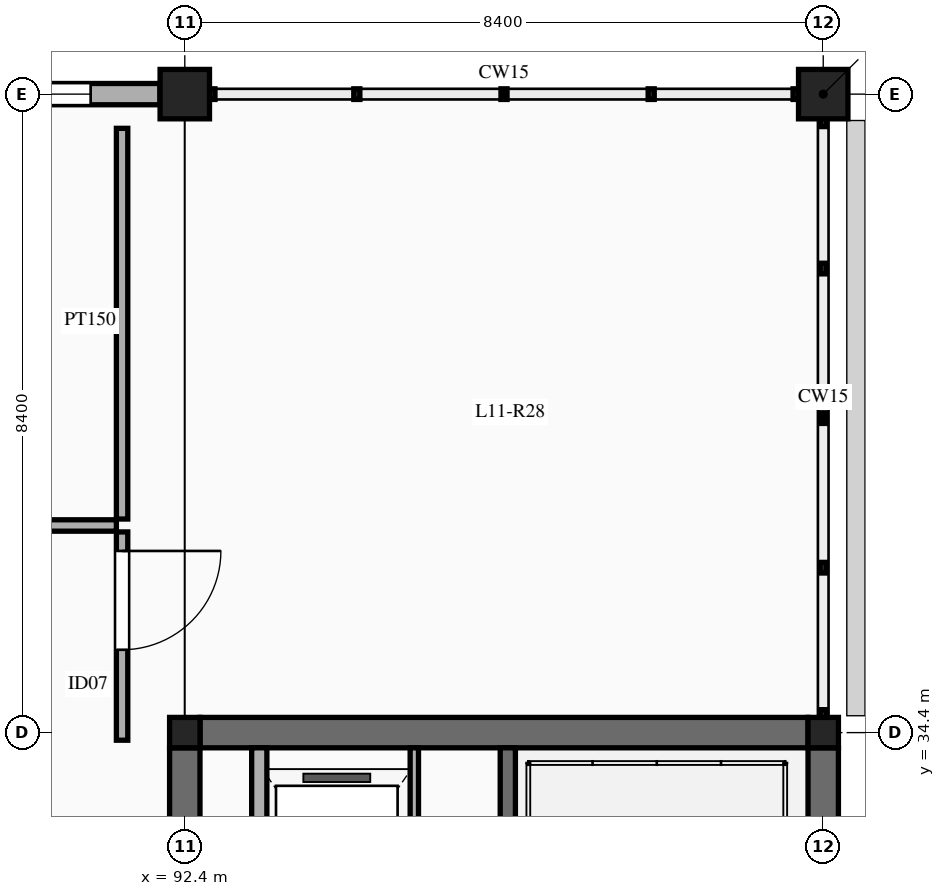
"""IFC4 building model, lengths in metres.
Left out: names, types, materials, properties, quantities, classifications, styles, units other than length and angle.
Written with IfcOpenShell. Run it as: python <this file> out.ifc"""

import sys

from ifc_helpers import new_model, si_unit, direction, frame, frame_2d, origin, origin_2d, place, context, subcontext, project, spatial, rectangle, extrude, element, fill, save


model = new_model("IFC4")
c1 = context("Model", 3, precision=1e-05, world=origin(), true_north=direction((0.0, 1.0)))
c2 = subcontext(c1, "Body", "Model", "MODEL_VIEW")
j1 = project(units=[si_unit("LENGTHUNIT", "METRE"), si_unit("PLANEANGLEUNIT", "RADIAN")], contexts=[c1])
p1 = place(None, origin())
s1 = spatial("IfcSite", under=j1, at=p1, CompositionType="ELEMENT")
p2 = place(p1, origin())
s2 = spatial("IfcBuilding", under=s1, at=p2, CompositionType="ELEMENT")
p3 = place(p2, frame((0.0, 0.0, 51.0)))
s3 = spatial("IfcBuildingStorey", under=s2, at=p3, CompositionType="ELEMENT", Elevation=51.0)
p4 = place(p3, frame((92.4, 34.4, 0.0), z_axis=(0.0, 0.0, 1.0), x_axis=(1.0, 0.0, 0.0)))
e1 = element("IfcColumn", 1, at=p4, inside=s3, PredefinedType="COLUMN", context=c2, shape_type="SweptSolid", body=[
    extrude(rectangle(XDim=0.4, YDim=0.4, at=origin_2d()), origin(), (0.0, 0.0, 1.0), 4.5),
])
p5 = place(p3, frame((92.4, 42.8, 0.0), z_axis=(0.0, 0.0, 1.0), x_axis=(1.0, 0.0, 0.0)))
e2 = element("IfcColumn", 2, at=p5, inside=s3, PredefinedType="COLUMN", context=c2, shape_type="SweptSolid", body=[
    extrude(rectangle(XDim=0.65, YDim=0.65, at=origin_2d()), origin(), (0.0, 0.0, 1.0), 4.5),
])
p6 = place(p3, frame((100.8, 34.4, 0.0), z_axis=(0.0, 0.0, 1.0), x_axis=(1.0, 0.0, 0.0)))
e3 = element("IfcColumn", 3, at=p6, inside=s3, PredefinedType="COLUMN", context=c2, shape_type="SweptSolid", body=[
    extrude(rectangle(XDim=0.4, YDim=0.4, at=origin_2d()), origin(), (0.0, 0.0, 1.0), 4.5),
])
p7 = place(p3, frame((100.8, 42.8, 0.0), z_axis=(0.0, 0.0, 1.0), x_axis=(1.0, 0.0, 0.0)))
e4 = element("IfcColumn", 4, at=p7, inside=s3, PredefinedType="COLUMN", context=c2, shape_type="SweptSolid", body=[
    extrude(rectangle(XDim=0.65, YDim=0.65, at=origin_2d()), origin(), (0.0, 0.0, 1.0), 4.5),
])
for number, where, z_axis, x_axis in (
    (5, (92.4, 26.2, 0.0), (0.0, 0.0, 1.0), (0.0, 1.0, 0.0)),
    (6, (100.8, 26.2, 0.0), (0.0, 0.0, 1.0), (0.0, 1.0, 0.0)),
    (7, (92.6, 34.4, 0.0), (0.0, 0.0, 1.0), (1.0, 0.0, 0.0)),
):
    element("IfcWall", number, at=place(p3, frame(where, z_axis=z_axis, x_axis=x_axis)), inside=s3, PredefinedType="SHEAR", context=c2, shape_type="SweptSolid", body=[
        extrude(rectangle(XDim=8.0, YDim=0.4, at=frame_2d((4.0, 0.0))), origin(), (0.0, 0.0, 1.0), 4.5),
    ])
p8 = place(p3, frame((84.327, 42.8, 0.0), z_axis=(0.0, 0.0, 1.0), x_axis=(1.0, 0.0, 0.0)))
e8 = element("IfcWall", 8, at=p8, inside=s3, PredefinedType="ELEMENTEDWALL", context=c2, shape_type="SweptSolid", body=[
    extrude(rectangle(XDim=7.746, YDim=0.28, at=frame_2d((3.873, 0.0))), origin(), (0.0, 0.0, 1.0), 3.55),
])
p9 = place(p8, frame((1.187, 0.0, 0.9)))
e9 = element("IfcOpeningElement", 9, at=p9, cuts=e8, PredefinedType="OPENING", context=c2, shape_type="SweptSolid", body=[
    extrude(rectangle(XDim=1.5, YDim=2.0, at=frame_2d((0.75, 1.0))), frame((0.0, 0.15, 0.0), z_axis=(0.0, -1.0, 0.0), x_axis=(1.0, 0.0, 0.0)), (0.0, 0.0, 1.0), 0.3),
])
p10 = place(p8, frame((4.784, 0.0, 0.9)))
e10 = element("IfcOpeningElement", 10, at=p10, cuts=e8, PredefinedType="OPENING", context=c2, shape_type="SweptSolid", body=[
    extrude(rectangle(XDim=2.05, YDim=2.1, at=frame_2d((1.025, 1.05))), frame((0.0, 0.15, 0.0), z_axis=(0.0, -1.0, 0.0), x_axis=(1.0, 0.0, 0.0)), (0.0, 0.0, 1.0), 0.3),
])
p11 = place(p3, frame((96.65, 26.1, 0.0), z_axis=(0.0, 0.0, 1.0), x_axis=(0.0, 1.0, 0.0)))
e11 = element("IfcWall", 11, at=p11, inside=s3, PredefinedType="SOLIDWALL", context=c2, shape_type="SweptSolid", body=[
    extrude(rectangle(XDim=8.1, YDim=0.2, at=frame_2d((4.05, 0.0))), origin(), (0.0, 0.0, 1.0), 4.3),
])
p12 = place(p11, frame((0.45, 0.0, 0.0)))
e12 = element("IfcOpeningElement", 12, at=p12, cuts=e11, PredefinedType="OPENING", context=c2, shape_type="SweptSolid", body=[
    extrude(rectangle(XDim=1.12, YDim=2.15, at=frame_2d((0.56, 1.075))), frame((0.0, 0.11, 0.0), z_axis=(0.0, -1.0, 0.0), x_axis=(1.0, 0.0, 0.0)), (0.0, 0.0, 1.0), 0.22),
])
p13 = place(p3, frame((95.42, 31.15, 0.0), z_axis=(0.0, 0.0, 1.0), x_axis=(0.0, 1.0, 0.0)))
e13 = element("IfcWall", 13, at=p13, inside=s3, PredefinedType="PARTITIONING", context=c2, shape_type="SweptSolid", body=[
    extrude(rectangle(XDim=3.05, YDim=0.11, at=frame_2d((1.525, 0.0))), origin(), (0.0, 0.0, 1.0), 4.3),
])
p14 = place(p3, frame((93.38, 31.15, 0.0), z_axis=(0.0, 0.0, 1.0), x_axis=(0.0, 1.0, 0.0)))
e14 = element("IfcWall", 14, at=p14, inside=s3, PredefinedType="SOLIDWALL", context=c2, shape_type="SweptSolid", body=[
    extrude(rectangle(XDim=3.05, YDim=0.2, at=frame_2d((1.525, 0.0))), origin(), (0.0, 0.0, 1.0), 4.3),
])
p15 = place(p3, frame((82.15, 37.125, 0.0), z_axis=(0.0, 0.0, 1.0), x_axis=(1.0, 0.0, 0.0)))
e15 = element("IfcWall", 15, at=p15, inside=s3, PredefinedType="PARTITIONING", context=c2, shape_type="SweptSolid", body=[
    extrude(rectangle(XDim=9.35, YDim=0.15, at=frame_2d((4.675, 0.0))), origin(), (0.0, 0.0, 1.0), 3.45),
])
p16 = place(p15, frame((4.175, 0.0, 0.0)))
e16 = element("IfcOpeningElement", 16, at=p16, cuts=e15, PredefinedType="OPENING", context=c2, shape_type="SweptSolid", body=[
    extrude(rectangle(XDim=1.0, YDim=2.15, at=frame_2d((0.5, 1.075))), frame((0.0, 0.085, 0.0), z_axis=(0.0, -1.0, 0.0), x_axis=(1.0, 0.0, 0.0)), (0.0, 0.0, 1.0), 0.17),
])
p17 = place(p3, frame((91.575, 34.3, 0.0), z_axis=(0.0, 0.0, 1.0), x_axis=(0.0, 1.0, 0.0)))
e17 = element("IfcWall", 17, at=p17, inside=s3, PredefinedType="PARTITIONING", context=c2, shape_type="SweptSolid", body=[
    extrude(rectangle(XDim=2.74, YDim=0.15, at=frame_2d((1.37, 0.0))), origin(), (0.0, 0.0, 1.0), 3.45),
])
p18 = place(p17, frame((1.19, 0.0, 0.0)))
e18 = element("IfcOpeningElement", 18, at=p18, cuts=e17, PredefinedType="OPENING", context=c2, shape_type="SweptSolid", body=[
    extrude(rectangle(XDim=1.3, YDim=2.25, at=frame_2d((0.65, 1.125))), frame((0.0, 0.085, 0.0), z_axis=(0.0, -1.0, 0.0), x_axis=(1.0, 0.0, 0.0)), (0.0, 0.0, 1.0), 0.17),
])
p19 = place(p3, frame((91.575, 37.21, 0.0), z_axis=(0.0, 0.0, 1.0), x_axis=(0.0, 1.0, 0.0)))
e19 = element("IfcWall", 19, at=p19, inside=s3, PredefinedType="PARTITIONING", context=c2, shape_type="SweptSolid", body=[
    extrude(rectangle(XDim=5.14, YDim=0.15, at=frame_2d((2.57, 0.0))), origin(), (0.0, 0.0, 1.0), 3.45),
])
p20 = place(p10, origin())
e20 = element("IfcWindow", 20, at=p20, inside=s3, PartitioningType="TRIPLE_PANEL_VERTICAL", PredefinedType="WINDOW", context=c2, shape_type="SweptSolid", body=[
    extrude(rectangle(XDim=2.05, YDim=2.1, at=frame_2d((1.025, 1.05))), frame((0.0, 0.03, 0.0), z_axis=(0.0, -1.0, 0.0), x_axis=(1.0, 0.0, 0.0)), (0.0, 0.0, 1.0), 0.06),
])
fill(e10, e20)
p21 = place(p18, frame((1.3, 0.0, 0.0), z_axis=(0.0, 0.0, 1.0), x_axis=(-1.0, 0.0, 0.0)))
e21 = element("IfcDoor", 21, at=p21, inside=s3, OperationType="SINGLE_SWING_LEFT", PredefinedType="DOOR", context=c2, shape_type="SweptSolid", body=[
    extrude(rectangle(XDim=1.3, YDim=2.25, at=frame_2d((0.65, 1.125))), frame((0.0, 0.025, 0.0), z_axis=(0.0, -1.0, 0.0), x_axis=(1.0, 0.0, 0.0)), (0.0, 0.0, 1.0), 0.05),
])
fill(e18, e21)
save(model, sys.argv[1])
